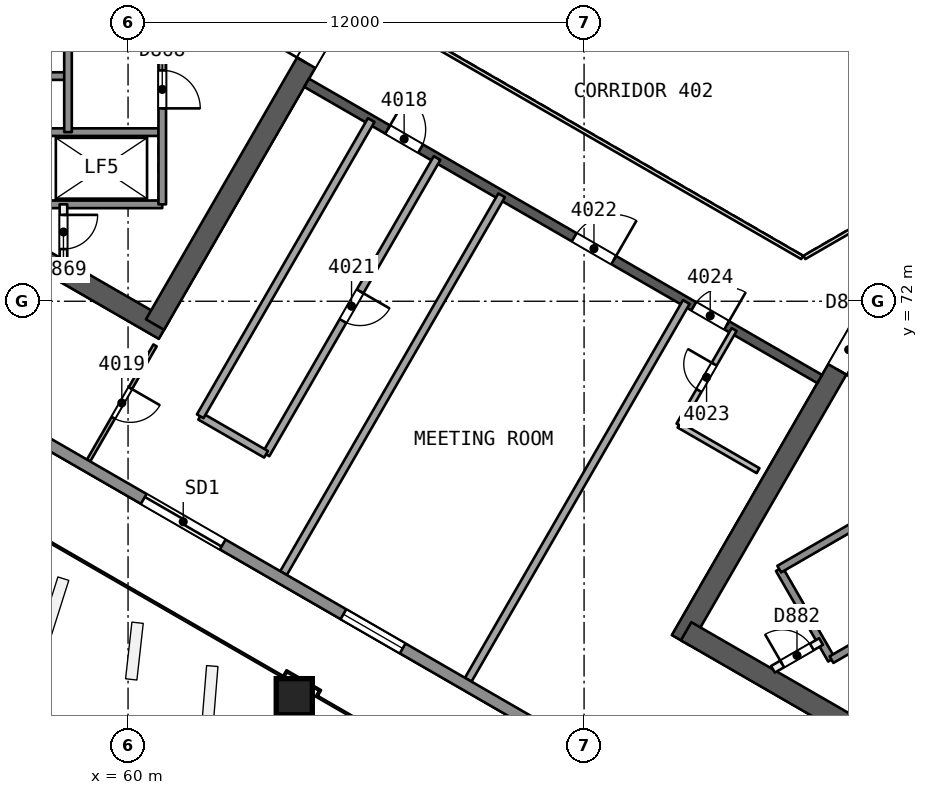
"""IFC4 building model, lengths in metres.
Left out: names, types, materials, properties, quantities, classifications, styles, units other than length and angle.
Written with IfcOpenShell. Run it as: python <this file> out.ifc"""

import sys

from ifc_helpers import new_model, si_unit, direction, frame, frame_2d, origin, origin_2d, place, context, subcontext, project, spatial, rectangle, extrude, element, fill, save


model = new_model("IFC4")
c1 = context("Model", 3, precision=1e-05, world=origin(), true_north=direction((0.0, 1.0)))
c2 = subcontext(c1, "Body", "Model", "MODEL_VIEW")
j1 = project(units=[si_unit("LENGTHUNIT", "METRE"), si_unit("PLANEANGLEUNIT", "RADIAN")], contexts=[c1])
p1 = place(None, origin())
s1 = spatial("IfcSite", under=j1, at=p1, CompositionType="ELEMENT")
p2 = place(p1, origin())
s2 = spatial("IfcBuilding", under=s1, at=p2, CompositionType="ELEMENT")
p3 = place(p2, frame((0.0, 0.0, 167.4)))
s3 = spatial("IfcBuildingStorey", under=s2, at=p3, CompositionType="ELEMENT", Elevation=167.4)
p4 = place(p3, frame((48.672, 78.336, 0.0), z_axis=(0.0, 0.0, 1.0), x_axis=(0.866023530946, -0.500003243837, 0.0)))
e1 = element("IfcWall", 1, at=p4, inside=s3, PredefinedType="SHEAR", context=c2, shape_type="SweptSolid", body=[
    extrude(rectangle(XDim=14.175, YDim=0.55, at=frame_2d((7.087, 0.0))), origin(), (0.0, 0.0, 1.0), 3.7),
])
p5 = place(p3, frame((60.709, 71.386, 0.0), z_axis=(0.0, 0.0, 1.0), x_axis=(0.500015938302, 0.866016201606, 0.0)))
e2 = element("IfcWall", 2, at=p5, inside=s3, PredefinedType="SHEAR", context=c2, shape_type="SweptSolid", body=[
    extrude(rectangle(XDim=10.105, YDim=0.55, at=frame_2d((5.053, 0.0))), origin(), (0.0, 0.0, 1.0), 3.7),
])
p6 = place(p5, frame((7.955, 0.0, 0.0)))
e3 = element("IfcOpeningElement", 3, at=p6, cuts=e2, PredefinedType="OPENING", context=c2, shape_type="SweptSolid", body=[
    extrude(rectangle(XDim=1.2, YDim=2.1, at=frame_2d((0.6, 1.05))), frame((0.0, 0.286, 0.0), z_axis=(0.0, -1.0, 0.0), x_axis=(1.0, 0.0, 0.0)), (0.0, 0.0, 1.0), 0.571),
])
p7 = place(p3, frame((79.659, 71.931, 0.0), z_axis=(0.0, 0.0, 1.0), x_axis=(-0.500000202252, -0.866025287014, 0.0)))
e4 = element("IfcWall", 4, at=p7, inside=s3, PredefinedType="SHEAR", context=c2, shape_type="SweptSolid", body=[
    extrude(rectangle(XDim=10.221, YDim=0.55, at=frame_2d((5.111, 0.0))), origin(), (0.0, 0.0, 1.0), 3.7),
])
p8 = place(p7, frame((0.791, 0.0, 0.0)))
e5 = element("IfcOpeningElement", 5, at=p8, cuts=e4, PredefinedType="OPENING", context=c2, shape_type="SweptSolid", body=[
    extrude(rectangle(XDim=1.2, YDim=2.1, at=frame_2d((0.6, 1.05))), frame((0.0, 0.286, 0.0), z_axis=(0.0, -1.0, 0.0), x_axis=(1.0, 0.0, 0.0)), (0.0, 0.0, 1.0), 0.571),
])
p9 = place(p3, frame((74.686, 63.317, 0.0), z_axis=(0.0, 0.0, 1.0), x_axis=(0.866024505738, -0.500001555459, 0.0)))
e6 = element("IfcWall", 6, at=p9, inside=s3, PredefinedType="SHEAR", context=c2, shape_type="SweptSolid", body=[
    extrude(rectangle(XDim=14.059, YDim=0.55, at=frame_2d((7.029, 0.0))), origin(), (0.0, 0.0, 1.0), 3.7),
])
p10 = place(p3, frame((64.7, 77.748, 0.0), z_axis=(0.0, 0.0, 1.0), x_axis=(0.866026492143, -0.499998114903, 0.0)))
e7 = element("IfcWall", 7, at=p10, inside=s3, PredefinedType="SHEAR", context=c2, shape_type="SweptSolid", body=[
    extrude(rectangle(XDim=15.588, YDim=0.25, at=frame_2d((7.794, 0.0))), origin(), (0.0, 0.0, 1.0), 3.25),
])
p11 = place(p10, frame((2.462, 0.0, 0.0)))
e8 = element("IfcOpeningElement", 8, at=p11, cuts=e7, PredefinedType="OPENING", context=c2, shape_type="SweptSolid", body=[
    extrude(rectangle(XDim=1.0, YDim=2.1, at=frame_2d((0.5, 1.05))), frame((0.0, 0.135, 0.0), z_axis=(0.0, -1.0, 0.0), x_axis=(1.0, 0.0, 0.0)), (0.0, 0.0, 1.0), 0.271),
])
p12 = place(p10, frame((8.129, 0.0, 0.0)))
e9 = element("IfcOpeningElement", 9, at=p12, cuts=e7, PredefinedType="OPENING", context=c2, shape_type="SweptSolid", body=[
    extrude(rectangle(XDim=1.2, YDim=2.4, at=frame_2d((0.6, 1.2))), frame((0.0, 0.135, 0.0), z_axis=(0.0, -1.0, 0.0), x_axis=(1.0, 0.0, 0.0)), (0.0, 0.0, 1.0), 0.271),
])
p13 = place(p10, frame((11.762, 0.0, 0.0)))
e10 = element("IfcOpeningElement", 10, at=p13, cuts=e7, PredefinedType="OPENING", context=c2, shape_type="SweptSolid", body=[
    extrude(rectangle(XDim=1.0, YDim=2.1, at=frame_2d((0.5, 1.05))), frame((0.0, 0.135, 0.0), z_axis=(0.0, -1.0, 0.0), x_axis=(1.0, 0.0, 0.0)), (0.0, 0.0, 1.0), 0.271),
])
p14 = place(p3, frame((64.362, 61.574, 0.0), z_axis=(0.010092954999, 0.017481261926, 0.999796248113), x_axis=(-0.866022643586, 0.500004780773, 1.3035e-08)))
e11 = element("IfcColumn", 11, at=p14, inside=s3, PredefinedType="COLUMN", context=c2, shape_type="SweptSolid", body=[
    extrude(rectangle(XDim=0.95, YDim=0.95, at=origin_2d()), origin(), (0.0, 0.0, 1.0), 3.701),
])
p15 = place(p3, frame((60.71, 70.838, 0.0), z_axis=(0.0, 0.0, 1.0), x_axis=(-0.499982229883, -0.866035663123, 0.0)))
e12 = element("IfcWall", 12, at=p15, inside=s3, PredefinedType="PARTITIONING", context=c2, shape_type="SweptSolid", body=[
    extrude(rectangle(XDim=3.498, YDim=0.1, at=frame_2d((1.749, 0.0))), origin(), (0.0, 0.0, 1.0), 3.25),
])
p16 = place(p15, frame((1.299, 0.0, 0.0)))
e13 = element("IfcOpeningElement", 13, at=p16, cuts=e12, PredefinedType="OPENING", context=c2, shape_type="SweptSolid", body=[
    extrude(rectangle(XDim=0.9, YDim=2.1, at=frame_2d((0.45, 1.05))), frame((0.0, 0.061, 0.0), z_axis=(0.0, -1.0, 0.0), x_axis=(1.0, 0.0, 0.0)), (0.0, 0.0, 1.0), 0.121),
])
p17 = place(p3, frame((68.131, 75.767, 0.0), z_axis=(0.0, 0.0, 1.0), x_axis=(-0.5000018851, -0.866024315419, 0.0)))
e14 = element("IfcWall", 14, at=p17, inside=s3, PredefinedType="PARTITIONING", context=c2, shape_type="SweptSolid", body=[
    extrude(rectangle(XDim=9.0, YDim=0.2, at=frame_2d((4.5, 0.0))), origin(), (0.0, 0.0, 1.0), 3.25),
])
p18 = place(p17, frame((4.05, 0.0, 0.0)))
e15 = element("IfcOpeningElement", 15, at=p18, cuts=e14, PredefinedType="OPENING", context=c2, shape_type="SweptSolid", body=[
    extrude(rectangle(XDim=0.9, YDim=2.1, at=frame_2d((0.45, 1.05))), frame((0.0, 0.11, 0.0), z_axis=(0.0, -1.0, 0.0), x_axis=(1.0, 0.0, 0.0)), (0.0, 0.0, 1.0), 0.221),
])
p19 = place(p3, frame((63.631, 67.973, 0.0), z_axis=(0.0, 0.0, 1.0), x_axis=(-0.866041268327, 0.499972520799, 0.0)))
e16 = element("IfcWall", 16, at=p19, inside=s3, PredefinedType="PARTITIONING", context=c2, shape_type="SweptSolid", body=[
    extrude(rectangle(XDim=2.0, YDim=0.2, at=frame_2d((1.0, 0.0))), origin(), (0.0, 0.0, 1.0), 3.25),
])
p20 = place(p3, frame((61.899, 68.973, 0.0), z_axis=(0.0, 0.0, 1.0), x_axis=(0.5000018851, 0.866024315419, 0.0)))
e17 = element("IfcWall", 17, at=p20, inside=s3, PredefinedType="PARTITIONING", context=c2, shape_type="SweptSolid", body=[
    extrude(rectangle(XDim=9.0, YDim=0.2, at=frame_2d((4.5, 0.0))), origin(), (0.0, 0.0, 1.0), 3.25),
])
for number, where, z_axis, x_axis in (
    (18, (64.092, 64.847, 0.0), (0.0, 0.0, 1.0), (0.5, 0.866, 0.0)),
    (19, (68.951, 62.041, 0.0), (0.0, 0.0, 1.0), (0.5, 0.866, 0.0)),
):
    element("IfcWall", number, at=place(p3, frame(where, z_axis=z_axis, x_axis=x_axis)), inside=s3, PredefinedType="PARTITIONING", context=c2, shape_type="SweptSolid", body=[
        extrude(rectangle(XDim=11.477, YDim=0.2, at=frame_2d((5.739, 0.0))), origin(), (0.0, 0.0, 1.0), 3.25),
    ])
p21 = place(p3, frame((76.578, 67.542, 0.0), z_axis=(0.0, 0.0, 1.0), x_axis=(-0.866038271014, 0.499977712642, 0.0)))
e20 = element("IfcWall", 20, at=p21, inside=s3, PredefinedType="PARTITIONING", context=c2, shape_type="SweptSolid", body=[
    extrude(rectangle(XDim=2.401, YDim=0.15, at=frame_2d((1.2, 0.0))), origin(), (0.0, 0.0, 1.0), 3.25),
])
p22 = place(p3, frame((74.498, 68.743, 0.0), z_axis=(0.0, 0.0, 1.0), x_axis=(0.499987231761, 0.866032775405, 0.0)))
e21 = element("IfcWall", 21, at=p22, inside=s3, PredefinedType="PARTITIONING", context=c2, shape_type="SweptSolid", body=[
    extrude(rectangle(XDim=2.9, YDim=0.15, at=frame_2d((1.45, 0.0))), origin(), (0.0, 0.0, 1.0), 3.25),
])
p23 = place(p22, frame((1.05, 0.0, 0.0)))
e22 = element("IfcOpeningElement", 22, at=p23, cuts=e21, PredefinedType="OPENING", context=c2, shape_type="SweptSolid", body=[
    extrude(rectangle(XDim=0.8, YDim=2.1, at=frame_2d((0.4, 1.05))), frame((0.0, 0.085, 0.0), z_axis=(0.0, -1.0, 0.0), x_axis=(1.0, 0.0, 0.0)), (0.0, 0.0, 1.0), 0.171),
])
p24 = place(p3, frame((88.955, 50.32, 0.0), z_axis=(0.0, 0.0, 1.0), x_axis=(-0.866024017239, 0.50000240156, 0.0)))
e23 = element("IfcWall", 23, at=p24, inside=s3, PredefinedType="SOLIDWALL", context=c2, shape_type="SweptSolid", body=[
    extrude(rectangle(XDim=53.85, YDim=0.3, at=frame_2d((26.925, 0.0))), origin(), (0.0, 0.0, 1.0), 3.25),
])
p25 = place(p24, frame((30.557, 0.0, 0.0)))
e24 = element("IfcOpeningElement", 24, at=p25, cuts=e23, PredefinedType="OPENING", context=c2, shape_type="SweptSolid", body=[
    extrude(rectangle(XDim=2.4, YDim=2.4, at=frame_2d((1.2, 1.2))), frame((0.0, 0.161, 0.0), z_axis=(0.0, -1.0, 0.0), x_axis=(1.0, 0.0, 0.0)), (0.0, 0.0, 1.0), 0.321),
])
p26 = place(p24, frame((41.847, 0.0, 0.0)))
e25 = element("IfcOpeningElement", 25, at=p26, cuts=e23, PredefinedType="OPENING", context=c2, shape_type="SweptSolid", body=[
    extrude(rectangle(XDim=2.4, YDim=2.4, at=frame_2d((1.2, 1.2))), frame((0.0, 0.161, 0.0), z_axis=(0.0, -1.0, 0.0), x_axis=(1.0, 0.0, 0.0)), (0.0, 0.0, 1.0), 0.321),
])
p27 = place(p24, frame((10.349, 0.0, 0.0)))
e26 = element("IfcOpeningElement", 26, at=p27, cuts=e23, PredefinedType="OPENING", context=c2, shape_type="SweptSolid", body=[
    extrude(rectangle(XDim=2.4, YDim=2.4, at=frame_2d((1.2, 1.2))), frame((0.0, 0.161, 0.0), z_axis=(0.0, -1.0, 0.0), x_axis=(1.0, 0.0, 0.0)), (0.0, 0.0, 1.0), 0.321),
])
p28 = place(p24, frame((25.09, 0.0, 0.9)))
e27 = element("IfcOpeningElement", 27, at=p28, cuts=e23, PredefinedType="OPENING", context=c2, shape_type="SweptSolid", body=[
    extrude(rectangle(XDim=1.8, YDim=1.5, at=frame_2d((0.9, 0.75))), frame((0.0, 0.161, 0.0), z_axis=(0.0, -1.0, 0.0), x_axis=(1.0, 0.0, 0.0)), (0.0, 0.0, 1.0), 0.321),
])
p29 = place(p3, frame((58.42, 77.925, 0.0), z_axis=(0.0, 0.0, 1.0), x_axis=(-1.0, 0.0, 0.0)))
e28 = element("IfcWall", 28, at=p29, inside=s3, PredefinedType="SOLIDWALL", context=c2, shape_type="SweptSolid", body=[
    extrude(rectangle(XDim=7.7, YDim=0.2, at=frame_2d((3.85, 0.0))), origin(), (0.0, 0.0, 1.0), 3.25),
])
p30 = place(p29, frame((0.55, 0.0, 0.0)))
e29 = element("IfcOpeningElement", 29, at=p30, cuts=e28, PredefinedType="OPENING", context=c2, shape_type="SweptSolid", body=[
    extrude(rectangle(XDim=1.1, YDim=2.1, at=frame_2d((0.55, 1.05))), frame((0.0, 0.11, 0.0), z_axis=(0.0, -1.0, 0.0), x_axis=(1.0, 0.0, 0.0)), (0.0, 0.0, 1.0), 0.221),
])
for number, where, z_axis, x_axis in (
    (30, (60.9, 76.45, 0.0), (0.0, 0.0, 1.0), (-1.0, 0.0, 0.0)),
    (31, (60.9, 74.55, 0.0), (0.0, 0.0, 1.0), (-1.0, 0.0, 0.0)),
):
    element("IfcWall", number, at=place(p3, frame(where, z_axis=z_axis, x_axis=x_axis)), inside=s3, PredefinedType="SOLIDWALL", context=c2, shape_type="SweptSolid", body=[
        extrude(rectangle(XDim=3.05, YDim=0.2, at=frame_2d((1.525, 0.0))), origin(), (0.0, 0.0, 1.0), 3.25),
    ])
p31 = place(p3, frame((60.9, 85.45, 0.0), z_axis=(0.0, 0.0, 1.0), x_axis=(0.0, -1.0, 0.0)))
e32 = element("IfcWall", 32, at=p31, inside=s3, PredefinedType="SOLIDWALL", context=c2, shape_type="SweptSolid", body=[
    extrude(rectangle(XDim=10.9, YDim=0.2, at=frame_2d((5.45, 0.0))), origin(), (0.0, 0.0, 1.0), 3.25),
])
p32 = place(p31, frame((2.875, 0.0, 0.0)))
e33 = element("IfcOpeningElement", 33, at=p32, cuts=e32, PredefinedType="OPENING", context=c2, shape_type="SweptSolid", body=[
    extrude(rectangle(XDim=1.0, YDim=2.1, at=frame_2d((0.5, 1.05))), frame((0.0, 0.11, 0.0), z_axis=(0.0, -1.0, 0.0), x_axis=(1.0, 0.0, 0.0)), (0.0, 0.0, 1.0), 0.221),
])
p33 = place(p31, frame((7.375, 0.0, 0.0)))
e34 = element("IfcOpeningElement", 34, at=p33, cuts=e32, PredefinedType="OPENING", context=c2, shape_type="SweptSolid", body=[
    extrude(rectangle(XDim=1.0, YDim=2.1, at=frame_2d((0.5, 1.05))), frame((0.0, 0.11, 0.0), z_axis=(0.0, -1.0, 0.0), x_axis=(1.0, 0.0, 0.0)), (0.0, 0.0, 1.0), 0.221),
])
p34 = place(p3, frame((58.42, 86.974, 0.0), z_axis=(0.0, 0.0, 1.0), x_axis=(0.0, -1.0, 0.0)))
e35 = element("IfcWall", 35, at=p34, inside=s3, PredefinedType="SOLIDWALL", context=c2, shape_type="SweptSolid", body=[
    extrude(rectangle(XDim=10.524, YDim=0.2, at=frame_2d((5.262, 0.0))), origin(), (0.0, 0.0, 1.0), 3.25),
])
p35 = place(p34, frame((0.312, 0.0, 0.0)))
e36 = element("IfcOpeningElement", 36, at=p35, cuts=e35, PredefinedType="OPENING", context=c2, shape_type="SweptSolid", body=[
    extrude(rectangle(XDim=0.9, YDim=2.1, at=frame_2d((0.45, 1.05))), frame((0.0, 0.11, 0.0), z_axis=(0.0, -1.0, 0.0), x_axis=(1.0, 0.0, 0.0)), (0.0, 0.0, 1.0), 0.221),
])
p36 = place(p3, frame((58.3, 74.55, 0.0), z_axis=(0.0, 0.0, 1.0), x_axis=(0.0, -1.0, 0.0)))
e37 = element("IfcWall", 37, at=p36, inside=s3, PredefinedType="PARTITIONING", context=c2, shape_type="SweptSolid", body=[
    extrude(rectangle(XDim=1.455, YDim=0.2, at=frame_2d((0.728, 0.0))), origin(), (0.0, 0.0, 1.0), 3.25),
])
p37 = place(p36, frame((0.278, 0.0, 0.0)))
e38 = element("IfcOpeningElement", 38, at=p37, cuts=e37, PredefinedType="OPENING", context=c2, shape_type="SweptSolid", body=[
    extrude(rectangle(XDim=0.9, YDim=2.1, at=frame_2d((0.45, 1.05))), frame((0.0, 0.11, 0.0), z_axis=(0.0, -1.0, 0.0), x_axis=(1.0, 0.0, 0.0)), (0.0, 0.0, 1.0), 0.221),
])
p38 = place(p3, frame((77.135, 64.952, 0.0), z_axis=(0.0, 0.0, 1.0), x_axis=(0.499996545922, -0.866027397988, 0.0)))
e39 = element("IfcWall", 39, at=p38, inside=s3, PredefinedType="SOLIDWALL", context=c2, shape_type="SweptSolid", body=[
    extrude(rectangle(XDim=2.75, YDim=0.2, at=frame_2d((1.375, 0.0))), origin(), (0.0, 0.0, 1.0), 3.25),
])
p39 = place(p3, frame((77.135, 64.952, 0.0), z_axis=(0.0, 0.0, 1.0), x_axis=(0.866031916153, 0.499988720078, 0.0)))
e40 = element("IfcWall", 40, at=p39, inside=s3, PredefinedType="SOLIDWALL", context=c2, shape_type="SweptSolid", body=[
    extrude(rectangle(XDim=11.35, YDim=0.2, at=frame_2d((5.675, 0.0))), origin(), (0.0, 0.0, 1.0), 3.25),
])
p40 = place(p3, frame((76.97, 62.316, 0.0), z_axis=(0.0, 0.0, 1.0), x_axis=(0.865982457891, 0.500074377092, 0.0)))
e41 = element("IfcWall", 41, at=p40, inside=s3, PredefinedType="PARTITIONING", context=c2, shape_type="SweptSolid", body=[
    extrude(rectangle(XDim=1.461, YDim=0.2, at=frame_2d((0.73, 0.0))), origin(), (0.0, 0.0, 1.0), 3.25),
])
p41 = place(p40, frame((0.281, 0.0, 0.0)))
e42 = element("IfcOpeningElement", 42, at=p41, cuts=e41, PredefinedType="OPENING", context=c2, shape_type="SweptSolid", body=[
    extrude(rectangle(XDim=0.9, YDim=2.1, at=frame_2d((0.45, 1.05))), frame((0.0, 0.11, 0.0), z_axis=(0.0, -1.0, 0.0), x_axis=(1.0, 0.0, 0.0)), (0.0, 0.0, 1.0), 0.221),
])
p42 = place(p3, frame((78.51, 62.57, 0.0), z_axis=(0.0, 0.0, 1.0), x_axis=(0.866053019151, 0.499952165731, 0.0)))
e43 = element("IfcWall", 43, at=p42, inside=s3, PredefinedType="SOLIDWALL", context=c2, shape_type="SweptSolid", body=[
    extrude(rectangle(XDim=2.3, YDim=0.2, at=frame_2d((1.15, 0.0))), origin(), (0.0, 0.0, 1.0), 3.25),
])
p43 = place(p3, frame((67.702, 78.948, 0.0), z_axis=(0.0, 0.0, 1.0), x_axis=(0.866026658274, -0.499997827154, 0.0)))
e44 = element("IfcWall", 44, at=p43, inside=s3, PredefinedType="PARTITIONING", context=c2, shape_type="SweptSolid", body=[
    extrude(rectangle(XDim=11.588, YDim=0.1, at=frame_2d((5.794, 0.0))), origin(), (0.0, 0.0, 1.0), 3.25),
])
p44 = place(p3, frame((77.798, 73.154, 0.0), z_axis=(0.0, 0.0, 1.0), x_axis=(0.866041268327, 0.499972520799, 0.0)))
e45 = element("IfcWall", 45, at=p44, inside=s3, PredefinedType="PARTITIONING", context=c2, shape_type="SweptSolid", body=[
    extrude(rectangle(XDim=2.0, YDim=0.1, at=frame_2d((1.0, 0.0))), origin(), (0.0, 0.0, 1.0), 3.25),
])
p45 = place(p11, origin())
e46 = element("IfcDoor", 46, at=p45, inside=s3, OperationType="SINGLE_SWING_LEFT", PredefinedType="NOTDEFINED", context=c2, shape_type="SweptSolid", body=[
    extrude(rectangle(XDim=1.0, YDim=2.1, at=frame_2d((0.5, 1.05))), frame((0.0, 0.025, 0.0), z_axis=(0.0, -1.0, 0.0), x_axis=(1.0, 0.0, 0.0)), (0.0, 0.0, 1.0), 0.05),
])
fill(e8, e46)
p46 = place(p16, origin())
e47 = element("IfcDoor", 47, at=p46, inside=s3, OperationType="SINGLE_SWING_LEFT", PredefinedType="NOTDEFINED", context=c2, shape_type="SweptSolid", body=[
    extrude(rectangle(XDim=0.9, YDim=2.1, at=frame_2d((0.45, 1.05))), frame((0.0, 0.025, 0.0), z_axis=(0.0, -1.0, 0.0), x_axis=(1.0, 0.0, 0.0)), (0.0, 0.0, 1.0), 0.05),
])
fill(e13, e47)
p47 = place(p18, origin())
e48 = element("IfcDoor", 48, at=p47, inside=s3, OperationType="SINGLE_SWING_LEFT", PredefinedType="NOTDEFINED", context=c2, shape_type="SweptSolid", body=[
    extrude(rectangle(XDim=0.9, YDim=2.1, at=frame_2d((0.45, 1.05))), frame((0.0, 0.025, 0.0), z_axis=(0.0, -1.0, 0.0), x_axis=(1.0, 0.0, 0.0)), (0.0, 0.0, 1.0), 0.05),
])
fill(e15, e48)
p48 = place(p12, origin())
e49 = element("IfcDoor", 49, at=p48, inside=s3, OperationType="SINGLE_SWING_RIGHT", PredefinedType="NOTDEFINED", context=c2, shape_type="SweptSolid", body=[
    extrude(rectangle(XDim=1.2, YDim=2.4, at=frame_2d((0.6, 1.2))), frame((0.0, 0.025, 0.0), z_axis=(0.0, -1.0, 0.0), x_axis=(1.0, 0.0, 0.0)), (0.0, 0.0, 1.0), 0.05),
])
fill(e9, e49)
p49 = place(p23, origin())
e50 = element("IfcDoor", 50, at=p49, inside=s3, OperationType="SINGLE_SWING_RIGHT", PredefinedType="NOTDEFINED", context=c2, shape_type="SweptSolid", body=[
    extrude(rectangle(XDim=0.8, YDim=2.1, at=frame_2d((0.4, 1.05))), frame((0.0, 0.025, 0.0), z_axis=(0.0, -1.0, 0.0), x_axis=(1.0, 0.0, 0.0)), (0.0, 0.0, 1.0), 0.05),
])
fill(e22, e50)
p50 = place(p13, origin())
e51 = element("IfcDoor", 51, at=p50, inside=s3, OperationType="SINGLE_SWING_RIGHT", PredefinedType="NOTDEFINED", context=c2, shape_type="SweptSolid", body=[
    extrude(rectangle(XDim=1.0, YDim=2.1, at=frame_2d((0.5, 1.05))), frame((0.0, 0.025, 0.0), z_axis=(0.0, -1.0, 0.0), x_axis=(1.0, 0.0, 0.0)), (0.0, 0.0, 1.0), 0.05),
])
fill(e10, e51)
p51 = place(p25, origin())
e52 = element("IfcDoor", 52, at=p51, inside=s3, OperationType="SLIDING_TO_LEFT", PredefinedType="NOTDEFINED", context=c2, shape_type="SweptSolid", body=[
    extrude(rectangle(XDim=2.4, YDim=2.4, at=frame_2d((1.2, 1.2))), frame((0.0, 0.025, 0.0), z_axis=(0.0, -1.0, 0.0), x_axis=(1.0, 0.0, 0.0)), (0.0, 0.0, 1.0), 0.05),
])
fill(e24, e52)
p52 = place(p28, origin())
e53 = element("IfcWindow", 53, at=p52, inside=s3, PartitioningType="SINGLE_PANEL", PredefinedType="WINDOW", context=c2, shape_type="SweptSolid", body=[
    extrude(rectangle(XDim=1.8, YDim=1.5, at=frame_2d((0.9, 0.75))), frame((0.0, 0.03, 0.0), z_axis=(0.0, -1.0, 0.0), x_axis=(1.0, 0.0, 0.0)), (0.0, 0.0, 1.0), 0.06),
])
fill(e27, e53)
p53 = place(p6, origin())
e54 = element("IfcDoor", 54, at=p53, inside=s3, OperationType="SINGLE_SWING_LEFT", PredefinedType="NOTDEFINED", context=c2, shape_type="SweptSolid", body=[
    extrude(rectangle(XDim=1.2, YDim=2.1, at=frame_2d((0.6, 1.05))), frame((0.0, 0.025, 0.0), z_axis=(0.0, -1.0, 0.0), x_axis=(1.0, 0.0, 0.0)), (0.0, 0.0, 1.0), 0.05),
])
fill(e3, e54)
p54 = place(p33, origin())
e55 = element("IfcDoor", 55, at=p54, inside=s3, OperationType="SINGLE_SWING_RIGHT", PredefinedType="NOTDEFINED", context=c2, shape_type="SweptSolid", body=[
    extrude(rectangle(XDim=1.0, YDim=2.1, at=frame_2d((0.5, 1.05))), frame((0.0, 0.025, 0.0), z_axis=(0.0, -1.0, 0.0), x_axis=(1.0, 0.0, 0.0)), (0.0, 0.0, 1.0), 0.05),
])
fill(e34, e55)
p55 = place(p37, origin())
e56 = element("IfcDoor", 56, at=p55, inside=s3, OperationType="SINGLE_SWING_LEFT", PredefinedType="NOTDEFINED", context=c2, shape_type="SweptSolid", body=[
    extrude(rectangle(XDim=0.9, YDim=2.1, at=frame_2d((0.45, 1.05))), frame((0.0, 0.025, 0.0), z_axis=(0.0, -1.0, 0.0), x_axis=(1.0, 0.0, 0.0)), (0.0, 0.0, 1.0), 0.05),
])
fill(e38, e56)
p56 = place(p8, origin())
e57 = element("IfcDoor", 57, at=p56, inside=s3, OperationType="SINGLE_SWING_RIGHT", PredefinedType="NOTDEFINED", context=c2, shape_type="SweptSolid", body=[
    extrude(rectangle(XDim=1.2, YDim=2.1, at=frame_2d((0.6, 1.05))), frame((0.0, 0.025, 0.0), z_axis=(0.0, -1.0, 0.0), x_axis=(1.0, 0.0, 0.0)), (0.0, 0.0, 1.0), 0.05),
])
fill(e5, e57)
p57 = place(p41, origin())
e58 = element("IfcDoor", 58, at=p57, inside=s3, OperationType="SINGLE_SWING_LEFT", PredefinedType="NOTDEFINED", context=c2, shape_type="SweptSolid", body=[
    extrude(rectangle(XDim=0.9, YDim=2.1, at=frame_2d((0.45, 1.05))), frame((0.0, 0.025, 0.0), z_axis=(0.0, -1.0, 0.0), x_axis=(1.0, 0.0, 0.0)), (0.0, 0.0, 1.0), 0.05),
])
fill(e42, e58)
save(model, sys.argv[1])
